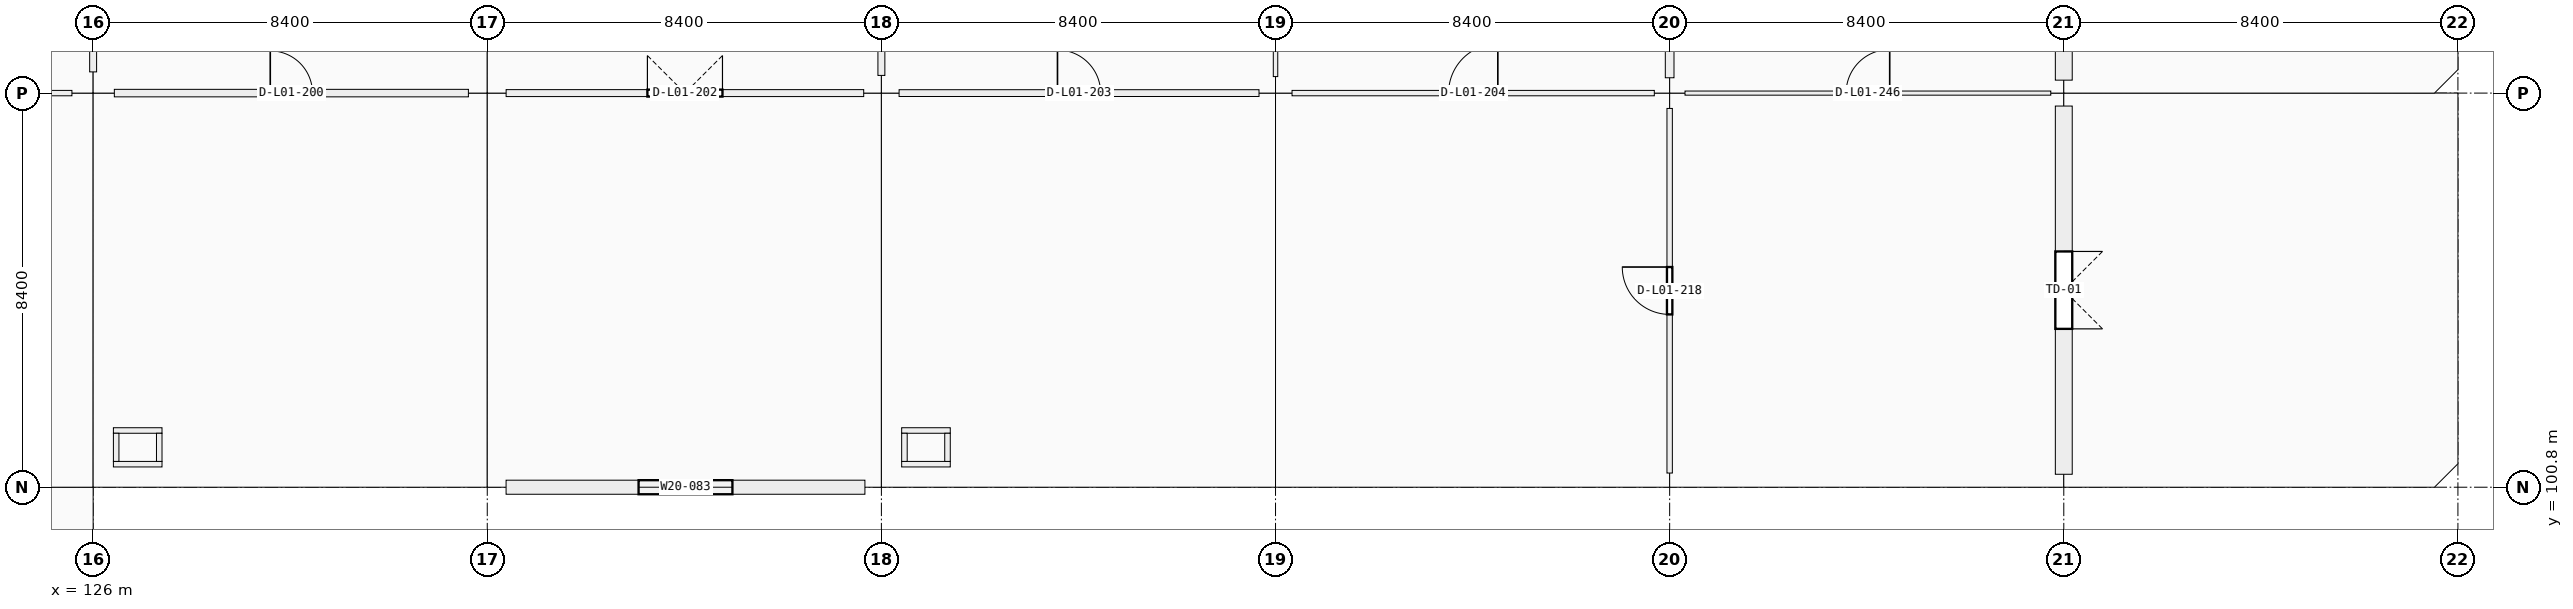
"""IFC4 building model, lengths in metres.
Left out: names, types, materials, properties, quantities, classifications, styles, units other than length and angle.
Written with IfcOpenShell. Run it as: python <this file> out.ifc"""

import sys

from ifc_helpers import new_model, si_unit, direction, frame, frame_2d, origin, origin_2d, place, context, subcontext, project, spatial, rectangle, extrude, element, fill, save


model = new_model("IFC4")
c1 = context("Model", 3, precision=1e-05, world=origin(), true_north=direction((0.0, 1.0)))
c2 = subcontext(c1, "Body", "Model", "MODEL_VIEW")
j1 = project(units=[si_unit("LENGTHUNIT", "METRE"), si_unit("PLANEANGLEUNIT", "RADIAN")], contexts=[c1])
p1 = place(None, origin())
s1 = spatial("IfcSite", under=j1, at=p1, CompositionType="ELEMENT")
p2 = place(p1, origin())
s2 = spatial("IfcBuilding", under=s1, at=p2, CompositionType="ELEMENT")
p3 = place(p2, frame((0.0, 0.0, 5.76)))
s3 = spatial("IfcBuildingStorey", under=s2, at=p3, CompositionType="ELEMENT", Elevation=5.76)
for number, where, z_axis, x_axis in (
    (1, (126.0, 100.8, 0.0), (0.0, 0.0, 1.0), (1.0, 0.0, 0.0)),
    (2, (126.0, 109.2, 0.0), (0.0, 0.0, 1.0), (1.0, 0.0, 0.0)),
):
    element("IfcColumn", number, at=place(p3, frame(where, z_axis=z_axis, x_axis=x_axis)), inside=s3, PredefinedType="COLUMN", context=c2, shape_type="SweptSolid", body=[
        extrude(rectangle(XDim=0.9, YDim=0.9, at=origin_2d()), origin(), (0.0, 0.0, 1.0), 4.5),
    ])
for number, where, z_axis, x_axis in (
    (3, (134.4, 100.8, 0.0), (0.0, 0.0, 1.0), (1.0, 0.0, 0.0)),
    (4, (134.4, 109.2, 0.0), (0.0, 0.0, 1.0), (1.0, 0.0, 0.0)),
):
    element("IfcColumn", number, at=place(p3, frame(where, z_axis=z_axis, x_axis=x_axis)), inside=s3, PredefinedType="COLUMN", context=c2, shape_type="SweptSolid", body=[
        extrude(rectangle(XDim=0.8, YDim=0.8, at=origin_2d()), origin(), (0.0, 0.0, 1.0), 4.5),
    ])
p4 = place(p3, frame((142.8, 100.8, 0.0), z_axis=(0.0, 0.0, 1.0), x_axis=(1.0, 0.0, 0.0)))
e5 = element("IfcColumn", 5, at=p4, inside=s3, PredefinedType="COLUMN", context=c2, shape_type="SweptSolid", body=[
    extrude(rectangle(XDim=0.7, YDim=0.7, at=origin_2d()), origin(), (0.0, 0.0, 1.0), 4.5),
])
for number, where, z_axis, x_axis in (
    (6, (142.8, 109.2, 0.0), (0.0, 0.0, 1.0), (1.0, 0.0, 0.0)),
    (7, (151.2, 100.8, 0.0), (0.0, 0.0, 1.0), (1.0, 0.0, 0.0)),
):
    element("IfcColumn", number, at=place(p3, frame(where, z_axis=z_axis, x_axis=x_axis)), inside=s3, PredefinedType="COLUMN", context=c2, shape_type="SweptSolid", body=[
        extrude(rectangle(XDim=0.75, YDim=0.75, at=origin_2d()), origin(), (0.0, 0.0, 1.0), 4.5),
    ])
p5 = place(p3, frame((151.2, 109.2, 0.0), z_axis=(0.0, 0.0, 1.0), x_axis=(1.0, 0.0, 0.0)))
e8 = element("IfcColumn", 8, at=p5, inside=s3, PredefinedType="COLUMN", context=c2, shape_type="SweptSolid", body=[
    extrude(rectangle(XDim=0.7, YDim=0.7, at=origin_2d()), origin(), (0.0, 0.0, 1.0), 4.5),
])
p6 = place(p3, frame((159.6, 100.8, 0.0), z_axis=(0.0, 0.0, 1.0), x_axis=(1.0, 0.0, 0.0)))
e9 = element("IfcColumn", 9, at=p6, inside=s3, PredefinedType="COLUMN", context=c2, shape_type="SweptSolid", body=[
    extrude(rectangle(XDim=0.6, YDim=0.6, at=origin_2d()), origin(), (0.0, 0.0, 1.0), 4.5),
])
p7 = place(p3, frame((159.6, 109.2, 0.0), z_axis=(0.0, 0.0, 1.0), x_axis=(1.0, 0.0, 0.0)))
e10 = element("IfcColumn", 10, at=p7, inside=s3, PredefinedType="COLUMN", context=c2, shape_type="SweptSolid", body=[
    extrude(rectangle(XDim=0.65, YDim=0.65, at=origin_2d()), origin(), (0.0, 0.0, 1.0), 4.5),
])
for number, where, z_axis, x_axis in (
    (11, (168.0, 100.8, 0.0), (0.0, 0.0, 1.0), (1.0, 0.0, 0.0)),
    (12, (168.0, 109.2, 0.0), (0.0, 0.0, 1.0), (1.0, 0.0, 0.0)),
):
    element("IfcColumn", number, at=place(p3, frame(where, z_axis=z_axis, x_axis=x_axis)), inside=s3, PredefinedType="COLUMN", context=c2, shape_type="SweptSolid", body=[
        extrude(rectangle(XDim=0.55, YDim=0.55, at=origin_2d()), origin(), (0.0, 0.0, 1.0), 4.2),
    ])
p8 = place(p3, frame((142.449, 100.8, 0.0), z_axis=(0.0, 0.0, 1.0), x_axis=(-1.0, 0.0, 0.0)))
e13 = element("IfcWall", 13, at=p8, inside=s3, PredefinedType="SOLIDWALL", context=c2, shape_type="SweptSolid", body=[
    extrude(rectangle(XDim=7.648, YDim=0.3, at=frame_2d((3.824, 0.0))), origin(), (0.0, 0.0, 1.0), 3.4),
])
p9 = place(p8, frame((2.824, 0.0, 0.9)))
e14 = element("IfcOpeningElement", 14, at=p9, cuts=e13, PredefinedType="OPENING", context=c2, shape_type="SweptSolid", body=[
    extrude(rectangle(XDim=2.0, YDim=2.25, at=frame_2d((1.0, 1.125))), frame((0.0, 0.15, 0.0), z_axis=(0.0, -1.0, 0.0), x_axis=(1.0, 0.0, 0.0)), (0.0, 0.0, 1.0), 0.3),
])
p10 = place(p3, frame((168.0, 108.924, 0.0), z_axis=(0.0, 0.0, 1.0), x_axis=(0.0, -1.0, 0.0)))
e15 = element("IfcWall", 15, at=p10, inside=s3, PredefinedType="SOLIDWALL", context=c2, shape_type="SweptSolid", body=[
    extrude(rectangle(XDim=7.848, YDim=0.36, at=frame_2d((3.924, 0.0))), origin(), (0.0, 0.0, 1.0), 3.4),
])
p11 = place(p10, frame((3.099, 0.0, 0.0)))
e16 = element("IfcOpeningElement", 16, at=p11, cuts=e15, PredefinedType="OPENING", context=c2, shape_type="SweptSolid", body=[
    extrude(rectangle(XDim=1.65, YDim=2.2, at=frame_2d((0.825, 1.1))), frame((0.0, 0.18, 0.0), z_axis=(0.0, -1.0, 0.0), x_axis=(1.0, 0.0, 0.0)), (0.0, 0.0, 1.0), 0.36),
])
p12 = place(p3, frame((168.0, 117.324, 0.0), z_axis=(0.0, 0.0, 1.0), x_axis=(0.0, -1.0, 0.0)))
e17 = element("IfcWall", 17, at=p12, inside=s3, PredefinedType="SOLIDWALL", context=c2, shape_type="SweptSolid", body=[
    extrude(rectangle(XDim=7.848, YDim=0.36, at=frame_2d((3.924, 0.0))), origin(), (0.0, 0.0, 1.0), 3.4),
])
p13 = place(p12, frame((3.364, 0.0, 0.0)))
e18 = element("IfcOpeningElement", 18, at=p13, cuts=e17, PredefinedType="OPENING", context=c2, shape_type="SweptSolid", body=[
    extrude(rectangle(XDim=1.12, YDim=2.2, at=frame_2d((0.56, 1.1))), frame((0.0, 0.18, 0.0), z_axis=(0.0, -1.0, 0.0), x_axis=(1.0, 0.0, 0.0)), (0.0, 0.0, 1.0), 0.36),
])
for number, where, z_axis, x_axis in (
    (19, (126.432, 101.291, 0.0), (0.0, 0.0, 1.0), (1.0, 0.0, 0.0)),
    (20, (126.432, 102.009, 0.0), (0.0, 0.0, 1.0), (1.0, 0.0, 0.0)),
):
    element("IfcWall", number, at=place(p3, frame(where, z_axis=z_axis, x_axis=x_axis)), inside=s3, PredefinedType="PARTITIONING", context=c2, shape_type="SweptSolid", body=[
        extrude(rectangle(XDim=1.036, YDim=0.118, at=frame_2d((0.518, 0.0))), origin(), (0.0, 0.0, 1.0), 3.48),
    ])
for number, where, z_axis, x_axis in (
    (21, (126.491, 101.35, 0.0), (0.0, 0.0, 1.0), (0.0, 1.0, 0.0)),
    (22, (127.409, 101.35, 0.0), (0.0, 0.0, 1.0), (0.0, 1.0, 0.0)),
):
    element("IfcWall", number, at=place(p3, frame(where, z_axis=z_axis, x_axis=x_axis)), inside=s3, PredefinedType="PARTITIONING", context=c2, shape_type="SweptSolid", body=[
        extrude(rectangle(XDim=0.6, YDim=0.118, at=frame_2d((0.3, 0.0))), origin(), (0.0, 0.0, 1.0), 3.48),
    ])
for number, where, z_axis, x_axis in (
    (23, (143.232, 101.291, 0.0), (0.0, 0.0, 1.0), (1.0, 0.0, 0.0)),
    (24, (143.232, 102.009, 0.0), (0.0, 0.0, 1.0), (1.0, 0.0, 0.0)),
):
    element("IfcWall", number, at=place(p3, frame(where, z_axis=z_axis, x_axis=x_axis)), inside=s3, PredefinedType="PARTITIONING", context=c2, shape_type="SweptSolid", body=[
        extrude(rectangle(XDim=1.036, YDim=0.118, at=frame_2d((0.518, 0.0))), origin(), (0.0, 0.0, 1.0), 3.48),
    ])
for number, where, z_axis, x_axis in (
    (25, (143.291, 101.35, 0.0), (0.0, 0.0, 1.0), (0.0, 1.0, 0.0)),
    (26, (144.209, 101.35, 0.0), (0.0, 0.0, 1.0), (0.0, 1.0, 0.0)),
):
    element("IfcWall", number, at=place(p3, frame(where, z_axis=z_axis, x_axis=x_axis)), inside=s3, PredefinedType="PARTITIONING", context=c2, shape_type="SweptSolid", body=[
        extrude(rectangle(XDim=0.6, YDim=0.118, at=frame_2d((0.3, 0.0))), origin(), (0.0, 0.0, 1.0), 3.48),
    ])
p14 = place(p3, frame((118.052, 109.2, 0.0), z_axis=(0.0, 0.0, 1.0), x_axis=(1.0, 0.0, 0.0)))
e27 = element("IfcWall", 27, at=p14, inside=s3, PredefinedType="PARTITIONING", context=c2, shape_type="SweptSolid", body=[
    extrude(rectangle(XDim=7.496, YDim=0.115, at=frame_2d((3.748, 0.0))), origin(), (0.0, 0.0, 1.0), 2.4),
])
p15 = place(p14, frame((3.248, 0.0, 0.0)))
e28 = element("IfcOpeningElement", 28, at=p15, cuts=e27, PredefinedType="OPENING", context=c2, shape_type="SweptSolid", body=[
    extrude(rectangle(XDim=1.0, YDim=2.2, at=frame_2d((0.5, 1.1))), frame((0.0, 0.058, 0.0), z_axis=(0.0, -1.0, 0.0), x_axis=(1.0, 0.0, 0.0)), (0.0, 0.0, 1.0), 0.115),
])
p16 = place(p3, frame((126.452, 109.2, 0.0), z_axis=(0.0, 0.0, 1.0), x_axis=(1.0, 0.0, 0.0)))
e29 = element("IfcWall", 29, at=p16, inside=s3, PredefinedType="PARTITIONING", context=c2, shape_type="SweptSolid", body=[
    extrude(rectangle(XDim=7.546, YDim=0.16, at=frame_2d((3.773, 0.0))), origin(), (0.0, 0.0, 1.0), 2.4),
])
p17 = place(p16, frame((3.323, 0.0, 0.0)))
e30 = element("IfcOpeningElement", 30, at=p17, cuts=e29, PredefinedType="OPENING", context=c2, shape_type="SweptSolid", body=[
    extrude(rectangle(XDim=0.9, YDim=2.05, at=frame_2d((0.45, 1.025))), frame((0.0, 0.08, 0.0), z_axis=(0.0, -1.0, 0.0), x_axis=(1.0, 0.0, 0.0)), (0.0, 0.0, 1.0), 0.16),
])
p18 = place(p3, frame((134.802, 109.2, 0.0), z_axis=(0.0, 0.0, 1.0), x_axis=(1.0, 0.0, 0.0)))
e31 = element("IfcWall", 31, at=p18, inside=s3, PredefinedType="PARTITIONING", context=c2, shape_type="SweptSolid", body=[
    extrude(rectangle(XDim=7.621, YDim=0.148, at=frame_2d((3.811, 0.0))), origin(), (0.0, 0.0, 1.0), 2.4),
])
p19 = place(p18, frame((3.011, 0.0, 0.0)))
e32 = element("IfcOpeningElement", 32, at=p19, cuts=e31, PredefinedType="OPENING", context=c2, shape_type="SweptSolid", body=[
    extrude(rectangle(XDim=1.6, YDim=2.2, at=frame_2d((0.8, 1.1))), frame((0.0, 0.074, 0.0), z_axis=(0.0, -1.0, 0.0), x_axis=(1.0, 0.0, 0.0)), (0.0, 0.0, 1.0), 0.148),
])
p20 = place(p3, frame((143.177, 109.2, 0.0), z_axis=(0.0, 0.0, 1.0), x_axis=(1.0, 0.0, 0.0)))
e33 = element("IfcWall", 33, at=p20, inside=s3, PredefinedType="PARTITIONING", context=c2, shape_type="SweptSolid", body=[
    extrude(rectangle(XDim=7.671, YDim=0.145, at=frame_2d((3.835, 0.0))), origin(), (0.0, 0.0, 1.0), 2.4),
])
p21 = place(p20, frame((3.376, 0.0, 0.0)))
e34 = element("IfcOpeningElement", 34, at=p21, cuts=e33, PredefinedType="OPENING", context=c2, shape_type="SweptSolid", body=[
    extrude(rectangle(XDim=0.92, YDim=2.15, at=frame_2d((0.46, 1.075))), frame((0.0, 0.073, 0.0), z_axis=(0.0, -1.0, 0.0), x_axis=(1.0, 0.0, 0.0)), (0.0, 0.0, 1.0), 0.145),
])
p22 = place(p3, frame((151.552, 109.2, 0.0), z_axis=(0.0, 0.0, 1.0), x_axis=(1.0, 0.0, 0.0)))
e35 = element("IfcWall", 35, at=p22, inside=s3, PredefinedType="PARTITIONING", context=c2, shape_type="SweptSolid", body=[
    extrude(rectangle(XDim=7.721, YDim=0.115, at=frame_2d((3.86, 0.0))), origin(), (0.0, 0.0, 1.0), 2.4),
])
p23 = place(p22, frame((3.336, 0.0, 0.0)))
e36 = element("IfcOpeningElement", 36, at=p23, cuts=e35, PredefinedType="OPENING", context=c2, shape_type="SweptSolid", body=[
    extrude(rectangle(XDim=1.05, YDim=2.12, at=frame_2d((0.525, 1.06))), frame((0.0, 0.058, 0.0), z_axis=(0.0, -1.0, 0.0), x_axis=(1.0, 0.0, 0.0)), (0.0, 0.0, 1.0), 0.115),
])
p24 = place(p3, frame((159.927, 109.2, 0.0), z_axis=(0.0, 0.0, 1.0), x_axis=(1.0, 0.0, 0.0)))
e37 = element("IfcWall", 37, at=p24, inside=s3, PredefinedType="PARTITIONING", context=c2, shape_type="SweptSolid", body=[
    extrude(rectangle(XDim=7.796, YDim=0.088, at=frame_2d((3.898, 0.0))), origin(), (0.0, 0.0, 1.0), 2.4),
])
p25 = place(p24, frame((3.433, 0.0, 0.0)))
e38 = element("IfcOpeningElement", 38, at=p25, cuts=e37, PredefinedType="OPENING", context=c2, shape_type="SweptSolid", body=[
    extrude(rectangle(XDim=0.93, YDim=2.12, at=frame_2d((0.465, 1.06))), frame((0.0, 0.044, 0.0), z_axis=(0.0, -1.0, 0.0), x_axis=(1.0, 0.0, 0.0)), (0.0, 0.0, 1.0), 0.088),
])
p26 = place(p3, frame((126.0, 109.652, 0.0), z_axis=(0.0, 0.0, 1.0), x_axis=(0.0, 1.0, 0.0)))
e39 = element("IfcWall", 39, at=p26, inside=s3, PredefinedType="PARTITIONING", context=c2, shape_type="SweptSolid", body=[
    extrude(rectangle(XDim=7.646, YDim=0.148, at=frame_2d((3.823, 0.0))), origin(), (0.0, 0.0, 1.0), 2.4),
])
p27 = place(p26, frame((3.248, 0.0, 0.0)))
e40 = element("IfcOpeningElement", 40, at=p27, cuts=e39, PredefinedType="OPENING", context=c2, shape_type="SweptSolid", body=[
    extrude(rectangle(XDim=1.15, YDim=2.2, at=frame_2d((0.575, 1.1))), frame((0.0, 0.074, 0.0), z_axis=(0.0, -1.0, 0.0), x_axis=(1.0, 0.0, 0.0)), (0.0, 0.0, 1.0), 0.148),
])
p28 = place(p3, frame((142.8, 109.577, 0.0), z_axis=(0.0, 0.0, 1.0), x_axis=(0.0, 1.0, 0.0)))
e41 = element("IfcWall", 41, at=p28, inside=s3, PredefinedType="PARTITIONING", context=c2, shape_type="SweptSolid", body=[
    extrude(rectangle(XDim=7.671, YDim=0.148, at=frame_2d((3.835, 0.0))), origin(), (0.0, 0.0, 1.0), 2.4),
])
p29 = place(p28, frame((3.285, 0.0, 0.0)))
e42 = element("IfcOpeningElement", 42, at=p29, cuts=e41, PredefinedType="OPENING", context=c2, shape_type="SweptSolid", body=[
    extrude(rectangle(XDim=1.1, YDim=2.15, at=frame_2d((0.55, 1.075))), frame((0.0, 0.074, 0.0), z_axis=(0.0, -1.0, 0.0), x_axis=(1.0, 0.0, 0.0)), (0.0, 0.0, 1.0), 0.148),
])
p30 = place(p3, frame((151.2, 109.552, 0.0), z_axis=(0.0, 0.0, 1.0), x_axis=(0.0, 1.0, 0.0)))
e43 = element("IfcWall", 43, at=p30, inside=s3, PredefinedType="PARTITIONING", context=c2, shape_type="SweptSolid", body=[
    extrude(rectangle(XDim=7.671, YDim=0.095, at=frame_2d((3.835, 0.0))), origin(), (0.0, 0.0, 1.0), 2.4),
])
p31 = place(p30, frame((3.371, 0.0, 0.0)))
e44 = element("IfcOpeningElement", 44, at=p31, cuts=e43, PredefinedType="OPENING", context=c2, shape_type="SweptSolid", body=[
    extrude(rectangle(XDim=0.93, YDim=2.12, at=frame_2d((0.465, 1.06))), frame((0.0, 0.047, 0.0), z_axis=(0.0, -1.0, 0.0), x_axis=(1.0, 0.0, 0.0)), (0.0, 0.0, 1.0), 0.095),
])
p32 = place(p3, frame((159.6, 101.102, 0.0), z_axis=(0.0, 0.0, 1.0), x_axis=(0.0, 1.0, 0.0)))
e45 = element("IfcWall", 45, at=p32, inside=s3, PredefinedType="PARTITIONING", context=c2, shape_type="SweptSolid", body=[
    extrude(rectangle(XDim=7.771, YDim=0.115, at=frame_2d((3.885, 0.0))), origin(), (0.0, 0.0, 1.0), 2.4),
])
p33 = place(p32, frame((3.381, 0.0, 0.0)))
e46 = element("IfcOpeningElement", 46, at=p33, cuts=e45, PredefinedType="OPENING", context=c2, shape_type="SweptSolid", body=[
    extrude(rectangle(XDim=1.01, YDim=2.12, at=frame_2d((0.505, 1.06))), frame((0.0, 0.058, 0.0), z_axis=(0.0, -1.0, 0.0), x_axis=(1.0, 0.0, 0.0)), (0.0, 0.0, 1.0), 0.115),
])
p34 = place(p3, frame((159.6, 109.527, 0.0), z_axis=(0.0, 0.0, 1.0), x_axis=(0.0, 1.0, 0.0)))
e47 = element("IfcWall", 47, at=p34, inside=s3, PredefinedType="PARTITIONING", context=c2, shape_type="SweptSolid", body=[
    extrude(rectangle(XDim=7.771, YDim=0.185, at=frame_2d((3.885, 0.0))), origin(), (0.0, 0.0, 1.0), 2.4),
])
p35 = place(p34, frame((3.375, 0.0, 0.0)))
e48 = element("IfcOpeningElement", 48, at=p35, cuts=e47, PredefinedType="OPENING", context=c2, shape_type="SweptSolid", body=[
    extrude(rectangle(XDim=1.02, YDim=2.2, at=frame_2d((0.51, 1.1))), frame((0.0, 0.093, 0.0), z_axis=(0.0, -1.0, 0.0), x_axis=(1.0, 0.0, 0.0)), (0.0, 0.0, 1.0), 0.185),
])
p36 = place(p9, origin())
e49 = element("IfcWindow", 49, at=p36, inside=s3, PartitioningType="SINGLE_PANEL", PredefinedType="WINDOW", context=c2, shape_type="SweptSolid", body=[
    extrude(rectangle(XDim=2.0, YDim=2.25, at=frame_2d((1.0, 1.125))), frame((0.0, 0.03, 0.0), z_axis=(0.0, -1.0, 0.0), x_axis=(1.0, 0.0, 0.0)), (0.0, 0.0, 1.0), 0.06),
])
fill(e14, e49)
p37 = place(p11, origin())
e50 = element("IfcDoor", 50, at=p37, inside=s3, OperationType="DOUBLE_DOOR_SINGLE_SWING", PredefinedType="DOOR", context=c2, shape_type="SweptSolid", body=[
    extrude(rectangle(XDim=1.65, YDim=2.2, at=frame_2d((0.825, 1.1))), frame((0.0, 0.025, 0.0), z_axis=(0.0, -1.0, 0.0), x_axis=(1.0, 0.0, 0.0)), (0.0, 0.0, 1.0), 0.05),
])
fill(e16, e50)
p38 = place(p17, origin())
e51 = element("IfcDoor", 51, at=p38, inside=s3, OperationType="SINGLE_SWING_LEFT", PredefinedType="DOOR", context=c2, shape_type="SweptSolid", body=[
    extrude(rectangle(XDim=0.9, YDim=2.05, at=frame_2d((0.45, 1.025))), frame((0.0, 0.025, 0.0), z_axis=(0.0, -1.0, 0.0), x_axis=(1.0, 0.0, 0.0)), (0.0, 0.0, 1.0), 0.05),
])
fill(e30, e51)
p39 = place(p19, origin())
e52 = element("IfcDoor", 52, at=p39, inside=s3, OperationType="DOUBLE_DOOR_SINGLE_SWING", PredefinedType="DOOR", context=c2, shape_type="SweptSolid", body=[
    extrude(rectangle(XDim=1.6, YDim=2.2, at=frame_2d((0.8, 1.1))), frame((0.0, 0.025, 0.0), z_axis=(0.0, -1.0, 0.0), x_axis=(1.0, 0.0, 0.0)), (0.0, 0.0, 1.0), 0.05),
])
fill(e32, e52)
p40 = place(p21, origin())
e53 = element("IfcDoor", 53, at=p40, inside=s3, OperationType="SINGLE_SWING_LEFT", PredefinedType="DOOR", context=c2, shape_type="SweptSolid", body=[
    extrude(rectangle(XDim=0.92, YDim=2.15, at=frame_2d((0.46, 1.075))), frame((0.0, 0.025, 0.0), z_axis=(0.0, -1.0, 0.0), x_axis=(1.0, 0.0, 0.0)), (0.0, 0.0, 1.0), 0.05),
])
fill(e34, e53)
p41 = place(p23, origin())
e54 = element("IfcDoor", 54, at=p41, inside=s3, OperationType="SINGLE_SWING_RIGHT", PredefinedType="DOOR", context=c2, shape_type="SweptSolid", body=[
    extrude(rectangle(XDim=1.05, YDim=2.12, at=frame_2d((0.525, 1.06))), frame((0.0, 0.025, 0.0), z_axis=(0.0, -1.0, 0.0), x_axis=(1.0, 0.0, 0.0)), (0.0, 0.0, 1.0), 0.05),
])
fill(e36, e54)
p42 = place(p33, origin())
e55 = element("IfcDoor", 55, at=p42, inside=s3, OperationType="SINGLE_SWING_RIGHT", PredefinedType="DOOR", context=c2, shape_type="SweptSolid", body=[
    extrude(rectangle(XDim=1.01, YDim=2.12, at=frame_2d((0.505, 1.06))), frame((0.0, 0.025, 0.0), z_axis=(0.0, -1.0, 0.0), x_axis=(1.0, 0.0, 0.0)), (0.0, 0.0, 1.0), 0.05),
])
fill(e46, e55)
p43 = place(p25, origin())
e56 = element("IfcDoor", 56, at=p43, inside=s3, OperationType="SINGLE_SWING_RIGHT", PredefinedType="DOOR", context=c2, shape_type="SweptSolid", body=[
    extrude(rectangle(XDim=0.93, YDim=2.12, at=frame_2d((0.465, 1.06))), frame((0.0, 0.025, 0.0), z_axis=(0.0, -1.0, 0.0), x_axis=(1.0, 0.0, 0.0)), (0.0, 0.0, 1.0), 0.05),
])
fill(e38, e56)
save(model, sys.argv[1])
